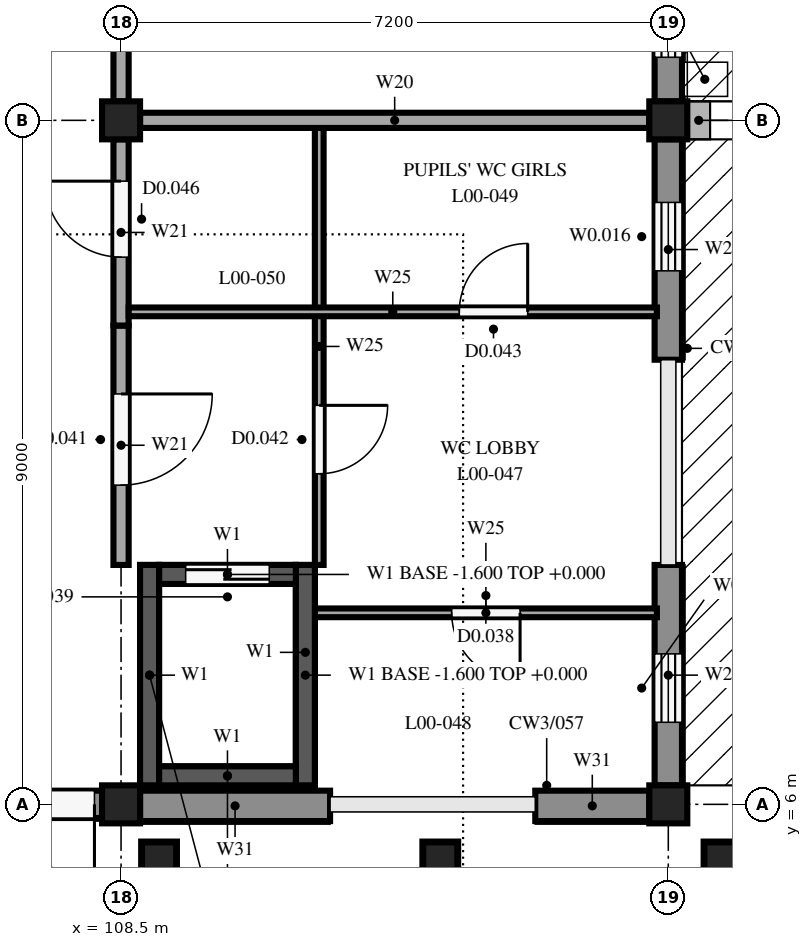
"""IFC4 building model, lengths in metres.
Left out: names, types, materials, properties, quantities, classifications, styles, units other than length and angle.
Written with IfcOpenShell. Run it as: python <this file> out.ifc"""

import sys

from ifc_helpers import new_model, si_unit, direction, frame, frame_2d, origin, origin_2d, place, context, subcontext, project, spatial, rectangle, extrude, element, fill, save


model = new_model("IFC4")
c1 = context("Model", 3, precision=1e-05, world=origin(), true_north=direction((0.0, 1.0)))
c2 = subcontext(c1, "Body", "Model", "MODEL_VIEW")
j1 = project(units=[si_unit("LENGTHUNIT", "METRE"), si_unit("PLANEANGLEUNIT", "RADIAN")], contexts=[c1])
p1 = place(None, origin())
s1 = spatial("IfcSite", under=j1, at=p1, CompositionType="ELEMENT")
p2 = place(p1, origin())
s2 = spatial("IfcBuilding", under=s1, at=p2, CompositionType="ELEMENT")
p3 = place(p2, origin())
s3 = spatial("IfcBuildingStorey", under=s2, at=p3, CompositionType="ELEMENT", Elevation=0.0)
for number, where, z_axis, x_axis in (
    (1, (108.5, 6.0, 0.0), (0.0, 0.0, 1.0), (1.0, 0.0, 0.0)),
    (2, (108.5, 15.0, 0.0), (0.0, 0.0, 1.0), (1.0, 0.0, 0.0)),
    (3, (115.7, 6.0, 0.0), (0.0, 0.0, 1.0), (1.0, 0.0, 0.0)),
    (4, (115.7, 15.0, 0.0), (0.0, 0.0, 1.0), (1.0, 0.0, 0.0)),
):
    element("IfcColumn", number, at=place(p3, frame(where, z_axis=z_axis, x_axis=x_axis)), inside=s3, PredefinedType="COLUMN", context=c2, shape_type="SweptSolid", body=[
        extrude(rectangle(XDim=0.5, YDim=0.5, at=origin_2d()), origin(), (0.0, 0.0, 1.0), 4.25),
    ])
for number, where, z_axis, x_axis in (
    (5, (108.875, 6.25, 0.0), (0.0, 0.0, 1.0), (0.0, 1.0, 0.0)),
    (6, (110.925, 6.25, 0.0), (0.0, 0.0, 1.0), (0.0, 1.0, 0.0)),
):
    element("IfcWall", number, at=place(p3, frame(where, z_axis=z_axis, x_axis=x_axis)), inside=s3, PredefinedType="SHEAR", context=c2, shape_type="SweptSolid", body=[
        extrude(rectangle(XDim=2.9, YDim=0.25, at=frame_2d((1.45, 0.0))), origin(), (0.0, 0.0, 1.0), 4.25),
    ])
p4 = place(p3, frame((109.0, 6.375, 0.0), z_axis=(0.0, 0.0, 1.0), x_axis=(1.0, 0.0, 0.0)))
e7 = element("IfcWall", 7, at=p4, inside=s3, PredefinedType="SHEAR", context=c2, shape_type="SweptSolid", body=[
    extrude(rectangle(XDim=1.8, YDim=0.25, at=frame_2d((0.9, 0.0))), origin(), (0.0, 0.0, 1.0), 4.25),
])
p5 = place(p3, frame((109.0, 9.025, 0.0), z_axis=(0.0, 0.0, 1.0), x_axis=(1.0, 0.0, 0.0)))
e8 = element("IfcWall", 8, at=p5, inside=s3, PredefinedType="SHEAR", context=c2, shape_type="SweptSolid", body=[
    extrude(rectangle(XDim=1.8, YDim=0.25, at=frame_2d((0.9, 0.0))), origin(), (0.0, 0.0, 1.0), 4.25),
])
p6 = place(p5, frame((0.35, 0.0, 0.0)))
e9 = element("IfcOpeningElement", 9, at=p6, cuts=e8, PredefinedType="OPENING", context=c2, shape_type="SweptSolid", body=[
    extrude(rectangle(XDim=1.1, YDim=2.1, at=frame_2d((0.55, 1.05))), frame((0.0, 0.135, 0.0), z_axis=(0.0, -1.0, 0.0), x_axis=(1.0, 0.0, 0.0)), (0.0, 0.0, 1.0), 0.27),
])
for number, where, z_axis, x_axis in (
    (10, (108.875, 6.25, -1.6), (0.0, 0.0, 1.0), (0.0, 1.0, 0.0)),
    (11, (110.925, 6.25, -1.6), (0.0, 0.0, 1.0), (0.0, 1.0, 0.0)),
):
    element("IfcWall", number, at=place(p3, frame(where, z_axis=z_axis, x_axis=x_axis)), inside=s3, PredefinedType="SHEAR", context=c2, shape_type="SweptSolid", body=[
        extrude(rectangle(XDim=2.9, YDim=0.25, at=frame_2d((1.45, 0.0))), origin(), (0.0, 0.0, 1.0), 1.6),
    ])
for number, where, z_axis, x_axis in (
    (12, (109.0, 6.375, -1.6), (0.0, 0.0, 1.0), (1.0, 0.0, 0.0)),
    (13, (109.0, 9.025, -1.6), (0.0, 0.0, 1.0), (1.0, 0.0, 0.0)),
):
    element("IfcWall", number, at=place(p3, frame(where, z_axis=z_axis, x_axis=x_axis)), inside=s3, PredefinedType="SHEAR", context=c2, shape_type="SweptSolid", body=[
        extrude(rectangle(XDim=1.8, YDim=0.25, at=frame_2d((0.9, 0.0))), origin(), (0.0, 0.0, 1.0), 1.6),
    ])
for number, where, z_axis, x_axis in (
    (14, (109.0, 5.275, -0.3), (0.0, 0.0, 1.0), (1.0, 0.0, 0.0)),
    (15, (112.7, 5.275, -0.3), (0.0, 0.0, 1.0), (1.0, 0.0, 0.0)),
    (16, (116.4, 5.275, -0.3), (0.0, 0.0, 1.0), (1.0, 0.0, 0.0)),
):
    element("IfcColumn", number, at=place(p3, frame(where, z_axis=z_axis, x_axis=x_axis)), inside=s3, PredefinedType="COLUMN", context=c2, shape_type="SweptSolid", body=[
        extrude(rectangle(XDim=0.45, YDim=0.45, at=origin_2d()), origin(), (0.0, 0.0, 1.0), 3.95),
    ])
p7 = place(p3, frame((115.7, 9.15, 0.0), z_axis=(0.0, 0.0, 1.0), x_axis=(0.0, -1.0, 0.0)))
e17 = element("IfcWall", 17, at=p7, inside=s3, PredefinedType="STANDARD", context=c2, shape_type="SweptSolid", body=[
    extrude(rectangle(XDim=2.9, YDim=0.36, at=frame_2d((1.45, 0.0))), origin(), (0.0, 0.0, 1.0), 3.75),
])
p8 = place(p7, frame((1.17, 0.0, 1.6)))
e18 = element("IfcOpeningElement", 18, at=p8, cuts=e17, PredefinedType="OPENING", context=c2, shape_type="SweptSolid", body=[
    extrude(rectangle(XDim=0.9, YDim=1.0, at=frame_2d((0.45, 0.5))), frame((0.0, 0.19, 0.0), z_axis=(0.0, -1.0, 0.0), x_axis=(1.0, 0.0, 0.0)), (0.0, 0.0, 1.0), 0.38),
])
p9 = place(p3, frame((115.7, 14.75, 0.0), z_axis=(0.0, 0.0, 1.0), x_axis=(0.0, -1.0, 0.0)))
e19 = element("IfcWall", 19, at=p9, inside=s3, PredefinedType="STANDARD", context=c2, shape_type="SweptSolid", body=[
    extrude(rectangle(XDim=2.9, YDim=0.36, at=frame_2d((1.45, 0.0))), origin(), (0.0, 0.0, 1.0), 3.75),
])
p10 = place(p9, frame((0.83, 0.0, 1.6)))
e20 = element("IfcOpeningElement", 20, at=p10, cuts=e19, PredefinedType="OPENING", context=c2, shape_type="SweptSolid", body=[
    extrude(rectangle(XDim=0.9, YDim=1.0, at=frame_2d((0.45, 0.5))), frame((0.0, 0.19, 0.0), z_axis=(0.0, -1.0, 0.0), x_axis=(1.0, 0.0, 0.0)), (0.0, 0.0, 1.0), 0.38),
])
p11 = place(p3, frame((115.7, 23.75, 0.0), z_axis=(0.0, 0.0, 1.0), x_axis=(0.0, -1.0, 0.0)))
e21 = element("IfcWall", 21, at=p11, inside=s3, PredefinedType="STANDARD", context=c2, shape_type="SweptSolid", body=[
    extrude(rectangle(XDim=8.5, YDim=0.36, at=frame_2d((4.25, 0.0))), origin(), (0.0, 0.0, 1.0), 3.75),
])
p12 = place(p11, frame((6.52, 0.0, 1.2)))
e22 = element("IfcOpeningElement", 22, at=p12, cuts=e21, PredefinedType="OPENING", context=c2, shape_type="SweptSolid", body=[
    extrude(rectangle(XDim=1.4, YDim=2.4, at=frame_2d((0.7, 1.2))), frame((0.0, 0.19, 0.0), z_axis=(0.0, -1.0, 0.0), x_axis=(1.0, 0.0, 0.0)), (0.0, 0.0, 1.0), 0.38),
])
p13 = place(p11, frame((4.54, 0.0, 1.2)))
e23 = element("IfcOpeningElement", 23, at=p13, cuts=e21, PredefinedType="OPENING", context=c2, shape_type="SweptSolid", body=[
    extrude(rectangle(XDim=1.4, YDim=2.4, at=frame_2d((0.7, 1.2))), frame((0.0, 0.19, 0.0), z_axis=(0.0, -1.0, 0.0), x_axis=(1.0, 0.0, 0.0)), (0.0, 0.0, 1.0), 0.38),
])
p14 = place(p11, frame((2.56, 0.0, 1.2)))
e24 = element("IfcOpeningElement", 24, at=p14, cuts=e21, PredefinedType="OPENING", context=c2, shape_type="SweptSolid", body=[
    extrude(rectangle(XDim=1.4, YDim=2.4, at=frame_2d((0.7, 1.2))), frame((0.0, 0.19, 0.0), z_axis=(0.0, -1.0, 0.0), x_axis=(1.0, 0.0, 0.0)), (0.0, 0.0, 1.0), 0.38),
])
p15 = place(p11, frame((0.58, 0.0, 1.2)))
e25 = element("IfcOpeningElement", 25, at=p15, cuts=e21, PredefinedType="OPENING", context=c2, shape_type="SweptSolid", body=[
    extrude(rectangle(XDim=1.4, YDim=2.4, at=frame_2d((0.7, 1.2))), frame((0.0, 0.19, 0.0), z_axis=(0.0, -1.0, 0.0), x_axis=(1.0, 0.0, 0.0)), (0.0, 0.0, 1.0), 0.38),
])
p16 = place(p3, frame((108.25, 6.0, 0.0), z_axis=(0.0, 0.0, 1.0), x_axis=(-1.0, 0.0, 0.0)))
e26 = element("IfcWall", 26, at=p16, inside=s3, PredefinedType="STANDARD", context=c2, shape_type="SweptSolid", body=[
    extrude(rectangle(XDim=2.2, YDim=0.36, at=frame_2d((1.1, 0.0))), origin(), (0.0, 0.0, 1.0), 3.9),
])
p17 = place(p16, frame((0.1, 0.0, 0.0)))
e27 = element("IfcOpeningElement", 27, at=p17, cuts=e26, PredefinedType="OPENING", context=c2, shape_type="SweptSolid", body=[
    extrude(rectangle(XDim=2.0, YDim=2.4, at=frame_2d((1.0, 1.2))), frame((0.0, 0.19, 0.0), z_axis=(0.0, -1.0, 0.0), x_axis=(1.0, 0.0, 0.0)), (0.0, 0.0, 1.0), 0.38),
])
p18 = place(p3, frame((111.25, 5.98, 0.0), z_axis=(0.0, 0.0, 1.0), x_axis=(-1.0, 0.0, 0.0)))
e28 = element("IfcWall", 28, at=p18, inside=s3, PredefinedType="STANDARD", context=c2, shape_type="SweptSolid", body=[
    extrude(rectangle(XDim=2.5, YDim=0.4, at=frame_2d((1.25, 0.0))), origin(), (0.0, 0.0, 1.0), 3.8),
])
p19 = place(p3, frame((115.45, 5.98, 0.0), z_axis=(0.0, 0.0, 1.0), x_axis=(-1.0, 0.0, 0.0)))
e29 = element("IfcWall", 29, at=p19, inside=s3, PredefinedType="STANDARD", context=c2, shape_type="SweptSolid", body=[
    extrude(rectangle(XDim=1.5, YDim=0.4, at=frame_2d((0.75, 0.0))), origin(), (0.0, 0.0, 1.0), 3.8),
])
p20 = place(p3, frame((108.5, 12.3, 0.0), z_axis=(0.0, 0.0, 1.0), x_axis=(0.0, -1.0, 0.0)))
e30 = element("IfcWall", 30, at=p20, inside=s3, PredefinedType="PARTITIONING", context=c2, shape_type="SweptSolid", body=[
    extrude(rectangle(XDim=3.15, YDim=0.2, at=frame_2d((1.575, 0.0))), origin(), (0.0, 0.0, 1.0), 3.8),
])
p21 = place(p20, frame((0.9, 0.0, 0.0)))
e31 = element("IfcOpeningElement", 31, at=p21, cuts=e30, PredefinedType="OPENING", context=c2, shape_type="SweptSolid", body=[
    extrude(rectangle(XDim=1.2, YDim=2.1, at=frame_2d((0.6, 1.05))), frame((0.0, 0.11, 0.0), z_axis=(0.0, -1.0, 0.0), x_axis=(1.0, 0.0, 0.0)), (0.0, 0.0, 1.0), 0.22),
])
p22 = place(p3, frame((108.5, 12.3, 0.0), z_axis=(0.0, 0.0, 1.0), x_axis=(0.0, 1.0, 0.0)))
e32 = element("IfcWall", 32, at=p22, inside=s3, PredefinedType="PARTITIONING", context=c2, shape_type="SweptSolid", body=[
    extrude(rectangle(XDim=2.45, YDim=0.2, at=frame_2d((1.225, 0.0))), origin(), (0.0, 0.0, 1.0), 3.8),
])
p23 = place(p22, frame((0.9, 0.0, 0.0)))
e33 = element("IfcOpeningElement", 33, at=p23, cuts=e32, PredefinedType="OPENING", context=c2, shape_type="SweptSolid", body=[
    extrude(rectangle(XDim=1.0, YDim=2.1, at=frame_2d((0.5, 1.05))), frame((0.0, 0.11, 0.0), z_axis=(0.0, -1.0, 0.0), x_axis=(1.0, 0.0, 0.0)), (0.0, 0.0, 1.0), 0.22),
])
p24 = place(p3, frame((108.75, 15.0, 0.0), z_axis=(0.0, 0.0, 1.0), x_axis=(1.0, 0.0, 0.0)))
e34 = element("IfcWall", 34, at=p24, inside=s3, PredefinedType="PARTITIONING", context=c2, shape_type="SweptSolid", body=[
    extrude(rectangle(XDim=6.7, YDim=0.2, at=frame_2d((3.35, 0.0))), origin(), (0.0, 0.0, 1.0), 3.8),
])
p25 = place(p3, frame((111.107, 14.9, 0.0), z_axis=(0.0, 0.0, 1.0), x_axis=(0.0, -1.0, 0.0)))
e35 = element("IfcWall", 35, at=p25, inside=s3, PredefinedType="PARTITIONING", context=c2, shape_type="SweptSolid", body=[
    extrude(rectangle(XDim=5.75, YDim=0.115, at=frame_2d((2.875, 0.0))), origin(), (0.0, 0.0, 1.0), 4.25),
])
p26 = place(p25, frame((3.65, 0.0, 0.0)))
e36 = element("IfcOpeningElement", 36, at=p26, cuts=e35, PredefinedType="OPENING", context=c2, shape_type="SweptSolid", body=[
    extrude(rectangle(XDim=0.9, YDim=2.1, at=frame_2d((0.45, 1.05))), frame((0.0, 0.067, 0.0), z_axis=(0.0, -1.0, 0.0), x_axis=(1.0, 0.0, 0.0)), (0.0, 0.0, 1.0), 0.135),
])
p27 = place(p3, frame((115.55, 8.52, 0.0), z_axis=(0.0, 0.0, 1.0), x_axis=(-1.0, 0.0, 0.0)))
e37 = element("IfcWall", 37, at=p27, inside=s3, PredefinedType="PARTITIONING", context=c2, shape_type="SweptSolid", body=[
    extrude(rectangle(XDim=4.5, YDim=0.115, at=frame_2d((2.25, 0.0))), origin(), (0.0, 0.0, 1.0), 4.25),
])
p28 = place(p27, frame((1.8, 0.0, 0.0)))
e38 = element("IfcOpeningElement", 38, at=p28, cuts=e37, PredefinedType="OPENING", context=c2, shape_type="SweptSolid", body=[
    extrude(rectangle(XDim=0.9, YDim=2.1, at=frame_2d((0.45, 1.05))), frame((0.0, 0.067, 0.0), z_axis=(0.0, -1.0, 0.0), x_axis=(1.0, 0.0, 0.0)), (0.0, 0.0, 1.0), 0.135),
])
p29 = place(p3, frame((108.6, 12.48, 0.0), z_axis=(0.0, 0.0, 1.0), x_axis=(1.0, 0.0, 0.0)))
e39 = element("IfcWall", 39, at=p29, inside=s3, PredefinedType="PARTITIONING", context=c2, shape_type="SweptSolid", body=[
    extrude(rectangle(XDim=6.95, YDim=0.115, at=frame_2d((3.475, 0.0))), origin(), (0.0, 0.0, 1.0), 4.25),
])
p30 = place(p29, frame((4.35, 0.0, 0.0)))
e40 = element("IfcOpeningElement", 40, at=p30, cuts=e39, PredefinedType="OPENING", context=c2, shape_type="SweptSolid", body=[
    extrude(rectangle(XDim=0.9, YDim=2.1, at=frame_2d((0.45, 1.05))), frame((0.0, 0.067, 0.0), z_axis=(0.0, -1.0, 0.0), x_axis=(1.0, 0.0, 0.0)), (0.0, 0.0, 1.0), 0.135),
])
p31 = place(p3, frame((108.5, 23.75, 0.0), z_axis=(0.0, 0.0, 1.0), x_axis=(0.0, -1.0, 0.0)))
e41 = element("IfcWall", 41, at=p31, inside=s3, PredefinedType="PARTITIONING", context=c2, shape_type="SweptSolid", body=[
    extrude(rectangle(XDim=8.5, YDim=0.2, at=frame_2d((4.25, 0.0))), origin(), (0.0, 0.0, 1.0), 3.8),
])
p32 = place(p31, frame((3.65, 0.0, 0.0)))
e42 = element("IfcOpeningElement", 42, at=p32, cuts=e41, PredefinedType="OPENING", context=c2, shape_type="SweptSolid", body=[
    extrude(rectangle(XDim=1.2, YDim=2.1, at=frame_2d((0.6, 1.05))), frame((0.0, 0.11, 0.0), z_axis=(0.0, -1.0, 0.0), x_axis=(1.0, 0.0, 0.0)), (0.0, 0.0, 1.0), 0.22),
])
p33 = place(p8, origin())
e43 = element("IfcWindow", 43, at=p33, inside=s3, PartitioningType="SINGLE_PANEL", PredefinedType="WINDOW", context=c2, shape_type="SweptSolid", body=[
    extrude(rectangle(XDim=0.9, YDim=1.0, at=frame_2d((0.45, 0.5))), frame((0.0, 0.03, 0.0), z_axis=(0.0, -1.0, 0.0), x_axis=(1.0, 0.0, 0.0)), (0.0, 0.0, 1.0), 0.06),
])
fill(e18, e43)
p34 = place(p10, origin())
e44 = element("IfcWindow", 44, at=p34, inside=s3, PartitioningType="SINGLE_PANEL", PredefinedType="WINDOW", context=c2, shape_type="SweptSolid", body=[
    extrude(rectangle(XDim=0.9, YDim=1.0, at=frame_2d((0.45, 0.5))), frame((0.0, 0.03, 0.0), z_axis=(0.0, -1.0, 0.0), x_axis=(1.0, 0.0, 0.0)), (0.0, 0.0, 1.0), 0.06),
])
fill(e20, e44)
p35 = place(p12, origin())
e45 = element("IfcWindow", 45, at=p35, inside=s3, PartitioningType="DOUBLE_PANEL_VERTICAL", PredefinedType="WINDOW", context=c2, shape_type="SweptSolid", body=[
    extrude(rectangle(XDim=1.4, YDim=2.4, at=frame_2d((0.7, 1.2))), frame((0.0, 0.03, 0.0), z_axis=(0.0, -1.0, 0.0), x_axis=(1.0, 0.0, 0.0)), (0.0, 0.0, 1.0), 0.06),
])
fill(e22, e45)
p36 = place(p17, origin())
e46 = element("IfcDoor", 46, at=p36, inside=s3, OperationType="DOUBLE_DOOR_SINGLE_SWING", PredefinedType="DOOR", context=c2, shape_type="SweptSolid", body=[
    extrude(rectangle(XDim=2.0, YDim=2.4, at=frame_2d((1.0, 1.2))), frame((0.0, 0.025, 0.0), z_axis=(0.0, -1.0, 0.0), x_axis=(1.0, 0.0, 0.0)), (0.0, 0.0, 1.0), 0.05),
])
fill(e27, e46)
p37 = place(p21, origin())
e47 = element("IfcDoor", 47, at=p37, inside=s3, OperationType="SINGLE_SWING_LEFT", PredefinedType="DOOR", context=c2, shape_type="SweptSolid", body=[
    extrude(rectangle(XDim=1.2, YDim=2.1, at=frame_2d((0.6, 1.05))), frame((0.0, 0.025, 0.0), z_axis=(0.0, -1.0, 0.0), x_axis=(1.0, 0.0, 0.0)), (0.0, 0.0, 1.0), 0.05),
])
fill(e31, e47)
p38 = place(p23, origin())
e48 = element("IfcDoor", 48, at=p38, inside=s3, OperationType="SINGLE_SWING_RIGHT", PredefinedType="DOOR", context=c2, shape_type="SweptSolid", body=[
    extrude(rectangle(XDim=1.0, YDim=2.1, at=frame_2d((0.5, 1.05))), frame((0.0, 0.025, 0.0), z_axis=(0.0, -1.0, 0.0), x_axis=(1.0, 0.0, 0.0)), (0.0, 0.0, 1.0), 0.05),
])
fill(e33, e48)
p39 = place(p26, origin())
e49 = element("IfcDoor", 49, at=p39, inside=s3, OperationType="SINGLE_SWING_LEFT", PredefinedType="DOOR", context=c2, shape_type="SweptSolid", body=[
    extrude(rectangle(XDim=0.9, YDim=2.1, at=frame_2d((0.45, 1.05))), frame((0.0, 0.025, 0.0), z_axis=(0.0, -1.0, 0.0), x_axis=(1.0, 0.0, 0.0)), (0.0, 0.0, 1.0), 0.05),
])
fill(e36, e49)
p40 = place(p28, origin())
e50 = element("IfcDoor", 50, at=p40, inside=s3, OperationType="SINGLE_SWING_LEFT", PredefinedType="DOOR", context=c2, shape_type="SweptSolid", body=[
    extrude(rectangle(XDim=0.9, YDim=2.1, at=frame_2d((0.45, 1.05))), frame((0.0, 0.025, 0.0), z_axis=(0.0, -1.0, 0.0), x_axis=(1.0, 0.0, 0.0)), (0.0, 0.0, 1.0), 0.05),
])
fill(e38, e50)
p41 = place(p30, origin())
e51 = element("IfcDoor", 51, at=p41, inside=s3, OperationType="SINGLE_SWING_RIGHT", PredefinedType="DOOR", context=c2, shape_type="SweptSolid", body=[
    extrude(rectangle(XDim=0.9, YDim=2.1, at=frame_2d((0.45, 1.05))), frame((0.0, 0.025, 0.0), z_axis=(0.0, -1.0, 0.0), x_axis=(1.0, 0.0, 0.0)), (0.0, 0.0, 1.0), 0.05),
])
fill(e40, e51)
p42 = place(p6, origin())
e52 = element("IfcDoor", 52, at=p42, inside=s3, OperationType="SLIDING_TO_LEFT", PredefinedType="DOOR", context=c2, shape_type="SweptSolid", body=[
    extrude(rectangle(XDim=1.1, YDim=2.1, at=frame_2d((0.55, 1.05))), frame((0.0, 0.025, 0.0), z_axis=(0.0, -1.0, 0.0), x_axis=(1.0, 0.0, 0.0)), (0.0, 0.0, 1.0), 0.05),
])
fill(e9, e52)
save(model, sys.argv[1])
